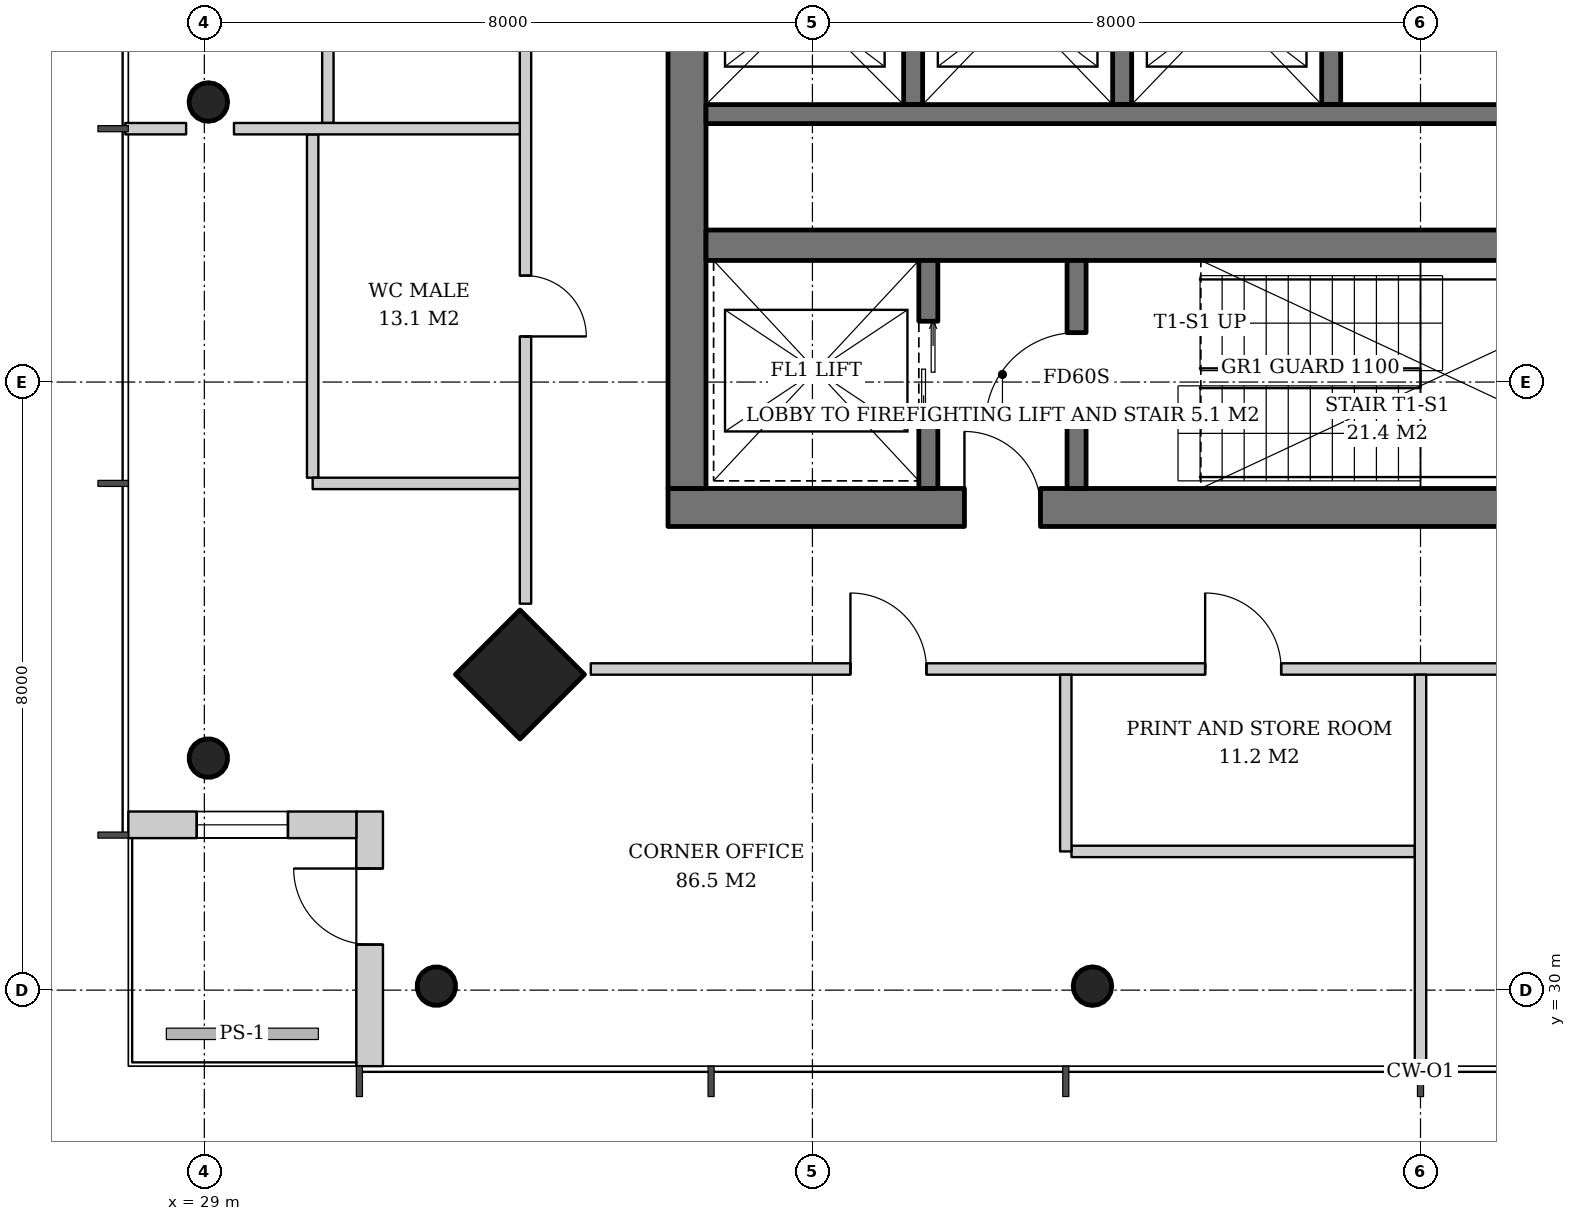
"""IFC4 building model, lengths in metres.
Left out: names, types, materials, properties, quantities, classifications, styles, units other than length and angle.
Written with IfcOpenShell. Run it as: python <this file> out.ifc"""

import sys

from ifc_helpers import new_model, si_unit, direction, frame, frame_2d, origin, origin_2d, place, context, subcontext, project, spatial, rectangle, hollow_circle, extrude, element, fill, save


model = new_model("IFC4")
c1 = context("Model", 3, precision=1e-05, world=origin(), true_north=direction((0.0, 1.0)))
c2 = subcontext(c1, "Body", "Model", "MODEL_VIEW")
j1 = project(units=[si_unit("LENGTHUNIT", "METRE"), si_unit("PLANEANGLEUNIT", "RADIAN")], contexts=[c1])
p1 = place(None, origin())
s1 = spatial("IfcSite", under=j1, at=p1, CompositionType="ELEMENT")
p2 = place(p1, origin())
s2 = spatial("IfcBuilding", under=s1, at=p2, CompositionType="ELEMENT")
p3 = place(p2, frame((0.0, 0.0, 271.8)))
s3 = spatial("IfcBuildingStorey", under=s2, at=p3, CompositionType="ELEMENT", Elevation=271.8)
p4 = place(p3, frame((33.114, 34.114, 0.0), z_axis=(0.031898107953, 0.031898107953, 0.998981992539), x_axis=(-0.707106781187, 0.707106781187, 0.0)))
e1 = element("IfcColumn", 1, at=p4, inside=s3, PredefinedType="COLUMN", context=c2, shape_type="SweptSolid", body=[
    extrude(rectangle(XDim=1.2, YDim=1.2, at=origin_2d()), origin(), (0.0, 0.0, 1.0), 3.804),
])
p5 = place(p3, frame((29.014, 33.014, 0.0), z_axis=(0.031898107953, 0.031898107953, 0.998981992539), x_axis=(-0.707106781187, 0.707106781187, 0.0)))
e2 = element("IfcColumn", 2, at=p5, inside=s3, PredefinedType="COLUMN", context=c2, shape_type="SweptSolid", body=[
    extrude(hollow_circle(Radius=0.254, WallThickness=0.02, at=origin_2d()), origin(), (0.0, 0.0, 1.0), 3.804),
])
p6 = place(p3, frame((29.014, 41.671, 0.0), z_axis=(0.031912535354, 0.010658915229, 0.999433828532), x_axis=(-0.316800238982, 0.948492281772, 0.0)))
e3 = element("IfcColumn", 3, at=p6, inside=s3, PredefinedType="COLUMN", context=c2, shape_type="SweptSolid", body=[
    extrude(hollow_circle(Radius=0.254, WallThickness=0.02, at=origin_2d()), origin(), (0.0, 0.0, 1.0), 3.802),
])
p7 = place(p3, frame((32.014, 30.014, 0.0), z_axis=(0.031898107953, 0.031898107953, 0.998981992539), x_axis=(-0.707106781187, 0.707106781187, 0.0)))
e4 = element("IfcColumn", 4, at=p7, inside=s3, PredefinedType="COLUMN", context=c2, shape_type="SweptSolid", body=[
    extrude(hollow_circle(Radius=0.254, WallThickness=0.02, at=origin_2d()), origin(), (0.0, 0.0, 1.0), 3.804),
])
p8 = place(p3, frame((40.671, 30.014, 0.0), z_axis=(0.010658915229, 0.031912535354, 0.999433828532), x_axis=(-0.948492281772, 0.316800238982, 0.0)))
e5 = element("IfcColumn", 5, at=p8, inside=s3, PredefinedType="COLUMN", context=c2, shape_type="SweptSolid", body=[
    extrude(hollow_circle(Radius=0.254, WallThickness=0.02, at=origin_2d()), origin(), (0.0, 0.0, 1.0), 3.802),
])
p9 = place(p3, frame((35.1, 36.35, 0.0), z_axis=(0.0, 0.0, 1.0), x_axis=(1.0, 0.0, 0.0)))
e6 = element("IfcWall", 6, at=p9, inside=s3, PredefinedType="SHEAR", context=c2, shape_type="SweptSolid", body=[
    extrude(rectangle(XDim=19.8, YDim=0.5, at=frame_2d((9.9, 0.0))), origin(), (0.0, 0.0, 1.0), 3.8),
])
p10 = place(p9, frame((3.9, 0.0, 0.0)))
e7 = element("IfcOpeningElement", 7, at=p10, cuts=e6, PredefinedType="OPENING", context=c2, shape_type="SweptSolid", body=[
    extrude(rectangle(XDim=1.0, YDim=2.1, at=frame_2d((0.5, 1.05))), frame((0.0, 0.26, 0.0), z_axis=(0.0, -1.0, 0.0), x_axis=(1.0, 0.0, 0.0)), (0.0, 0.0, 1.0), 0.52),
])
p11 = place(p9, frame((15.35, 0.0, 0.0)))
e8 = element("IfcOpeningElement", 8, at=p11, cuts=e6, PredefinedType="OPENING", context=c2, shape_type="SweptSolid", body=[
    extrude(rectangle(XDim=1.0, YDim=2.1, at=frame_2d((0.5, 1.05))), frame((0.0, 0.26, 0.0), z_axis=(0.0, -1.0, 0.0), x_axis=(1.0, 0.0, 0.0)), (0.0, 0.0, 1.0), 0.52),
])
p12 = place(p3, frame((35.35, 36.6, 0.0), z_axis=(0.0, 0.0, 1.0), x_axis=(0.0, 1.0, 0.0)))
e9 = element("IfcWall", 9, at=p12, inside=s3, PredefinedType="SHEAR", context=c2, shape_type="SweptSolid", body=[
    extrude(rectangle(XDim=18.8, YDim=0.5, at=frame_2d((9.4, 0.0))), origin(), (0.0, 0.0, 1.0), 3.8),
])
p13 = place(p12, frame((8.5, 0.0, 0.0)))
e10 = element("IfcOpeningElement", 10, at=p13, cuts=e9, PredefinedType="OPENING", context=c2, shape_type="SweptSolid", body=[
    extrude(rectangle(XDim=1.8, YDim=2.4, at=frame_2d((0.9, 1.2))), frame((0.0, 0.26, 0.0), z_axis=(0.0, -1.0, 0.0), x_axis=(1.0, 0.0, 0.0)), (0.0, 0.0, 1.0), 0.52),
])
p14 = place(p3, frame((35.6, 39.8, 0.0), z_axis=(0.0, 0.0, 1.0), x_axis=(1.0, 0.0, 0.0)))
e11 = element("IfcWall", 11, at=p14, inside=s3, PredefinedType="SHEAR", context=c2, shape_type="SweptSolid", body=[
    extrude(rectangle(XDim=18.8, YDim=0.4, at=frame_2d((9.4, 0.0))), origin(), (0.0, 0.0, 1.0), 3.8),
])
p15 = place(p3, frame((31.175, 29.0, 0.0), z_axis=(0.0, 0.0, 1.0), x_axis=(0.0, 1.0, 0.0)))
e12 = element("IfcWall", 12, at=p15, inside=s3, PredefinedType="SOLIDWALL", context=c2, shape_type="SweptSolid", body=[
    extrude(rectangle(XDim=3.35, YDim=0.35, at=frame_2d((1.675, 0.0))), origin(), (0.0, 0.0, 1.0), 3.62),
])
p16 = place(p15, frame((1.6, 0.0, 0.0)))
e13 = element("IfcOpeningElement", 13, at=p16, cuts=e12, PredefinedType="OPENING", context=c2, shape_type="SweptSolid", body=[
    extrude(rectangle(XDim=1.0, YDim=2.4, at=frame_2d((0.5, 1.2))), frame((0.0, 0.185, 0.0), z_axis=(0.0, -1.0, 0.0), x_axis=(1.0, 0.0, 0.0)), (0.0, 0.0, 1.0), 0.37),
])
p17 = place(p3, frame((31.0, 32.175, 0.0), z_axis=(0.0, 0.0, 1.0), x_axis=(-1.0, 0.0, 0.0)))
e14 = element("IfcWall", 14, at=p17, inside=s3, PredefinedType="SOLIDWALL", context=c2, shape_type="SweptSolid", body=[
    extrude(rectangle(XDim=3.0, YDim=0.35, at=frame_2d((1.5, 0.0))), origin(), (0.0, 0.0, 1.0), 3.62),
])
p18 = place(p17, frame((0.9, 0.0, 0.6)))
e15 = element("IfcOpeningElement", 15, at=p18, cuts=e14, PredefinedType="OPENING", context=c2, shape_type="SweptSolid", body=[
    extrude(rectangle(XDim=1.2, YDim=2.55, at=frame_2d((0.6, 1.275))), frame((0.0, 0.185, 0.0), z_axis=(0.0, -1.0, 0.0), x_axis=(1.0, 0.0, 0.0)), (0.0, 0.0, 1.0), 0.37),
])
p19 = place(p3, frame((38.525, 36.6, 0.0), z_axis=(0.0, 0.0, 1.0), x_axis=(0.0, 1.0, 0.0)))
e16 = element("IfcWall", 16, at=p19, inside=s3, PredefinedType="SHEAR", context=c2, shape_type="SweptSolid", body=[
    extrude(rectangle(XDim=3.0, YDim=0.25, at=frame_2d((1.5, 0.0))), origin(), (0.0, 0.0, 1.0), 3.8),
])
p20 = place(p19, frame((0.9, 0.0, 0.0)))
e17 = element("IfcOpeningElement", 17, at=p20, cuts=e16, PredefinedType="OPENING", context=c2, shape_type="SweptSolid", body=[
    extrude(rectangle(XDim=1.3, YDim=2.2, at=frame_2d((0.65, 1.1))), frame((0.0, 0.135, 0.0), z_axis=(0.0, -1.0, 0.0), x_axis=(1.0, 0.0, 0.0)), (0.0, 0.0, 1.0), 0.27),
])
p21 = place(p3, frame((40.475, 36.6, 0.0), z_axis=(0.0, 0.0, 1.0), x_axis=(0.0, 1.0, 0.0)))
e18 = element("IfcWall", 18, at=p21, inside=s3, PredefinedType="SHEAR", context=c2, shape_type="SweptSolid", body=[
    extrude(rectangle(XDim=3.0, YDim=0.25, at=frame_2d((1.5, 0.0))), origin(), (0.0, 0.0, 1.0), 3.8),
])
p22 = place(p21, frame((0.85, 0.0, 0.0)))
e19 = element("IfcOpeningElement", 19, at=p22, cuts=e18, PredefinedType="OPENING", context=c2, shape_type="SweptSolid", body=[
    extrude(rectangle(XDim=1.2, YDim=2.1, at=frame_2d((0.6, 1.05))), frame((0.0, 0.135, 0.0), z_axis=(0.0, -1.0, 0.0), x_axis=(1.0, 0.0, 0.0)), (0.0, 0.0, 1.0), 0.27),
])
for number, where, z_axis, x_axis in (
    (20, (38.325, 44.25, 0.0), (0.0, 0.0, 1.0), (0.0, -1.0, 0.0)),
    (21, (41.075, 44.25, 0.0), (0.0, 0.0, 1.0), (0.0, -1.0, 0.0)),
    (22, (43.825, 44.25, 0.0), (0.0, 0.0, 1.0), (0.0, -1.0, 0.0)),
):
    element("IfcWall", number, at=place(p3, frame(where, z_axis=z_axis, x_axis=x_axis)), inside=s3, PredefinedType="SHEAR", context=c2, shape_type="SweptSolid", body=[
        extrude(rectangle(XDim=2.6, YDim=0.25, at=frame_2d((1.3, 0.0))), origin(), (0.0, 0.0, 1.0), 3.8),
    ])
p23 = place(p3, frame((35.6, 41.525, 0.0), z_axis=(0.0, 0.0, 1.0), x_axis=(1.0, 0.0, 0.0)))
e23 = element("IfcWall", 23, at=p23, inside=s3, PredefinedType="SHEAR", context=c2, shape_type="SweptSolid", body=[
    extrude(rectangle(XDim=11.1, YDim=0.25, at=frame_2d((5.55, 0.0))), origin(), (0.0, 0.0, 1.0), 3.8),
])
for number, where, z_axis, x_axis in (
    (24, (30.625, 45.925, 0.0), (0.0, 0.0, 1.0), (0.0, -1.0, 0.0)),
    (25, (30.425, 41.258, 0.0), (0.0, 0.0, 1.0), (0.0, -1.0, 0.0)),
):
    element("IfcWall", number, at=place(p3, frame(where, z_axis=z_axis, x_axis=x_axis)), inside=s3, PredefinedType="PARTITIONING", context=c2, shape_type="SweptSolid", body=[
        extrude(rectangle(XDim=4.517, YDim=0.15, at=frame_2d((2.258, 0.0))), origin(), (0.0, 0.0, 1.0), 3.12),
    ])
p24 = place(p3, frame((33.225, 56.916, 0.0), z_axis=(0.0, 0.0, 1.0), x_axis=(0.0, -1.0, 0.0)))
e26 = element("IfcWall", 26, at=p24, inside=s3, PredefinedType="PARTITIONING", context=c2, shape_type="SweptSolid", body=[
    extrude(rectangle(XDim=21.832, YDim=0.15, at=frame_2d((10.916, 0.0))), origin(), (0.0, 0.0, 1.0), 3.02),
])
p25 = place(p24, frame((3.416, 0.0, 0.0)))
e27 = element("IfcOpeningElement", 27, at=p25, cuts=e26, PredefinedType="OPENING", context=c2, shape_type="SweptSolid", body=[
    extrude(rectangle(XDim=1.0, YDim=2.1, at=frame_2d((0.5, 1.05))), frame((0.0, 0.085, 0.0), z_axis=(0.0, -1.0, 0.0), x_axis=(1.0, 0.0, 0.0)), (0.0, 0.0, 1.0), 0.17),
])
p26 = place(p24, frame((8.182, 0.0, 0.0)))
e28 = element("IfcOpeningElement", 28, at=p26, cuts=e26, PredefinedType="OPENING", context=c2, shape_type="SweptSolid", body=[
    extrude(rectangle(XDim=0.8, YDim=2.1, at=frame_2d((0.4, 1.05))), frame((0.0, 0.085, 0.0), z_axis=(0.0, -1.0, 0.0), x_axis=(1.0, 0.0, 0.0)), (0.0, 0.0, 1.0), 0.17),
])
p27 = place(p24, frame((12.749, 0.0, 0.0)))
e29 = element("IfcOpeningElement", 29, at=p27, cuts=e26, PredefinedType="OPENING", context=c2, shape_type="SweptSolid", body=[
    extrude(rectangle(XDim=1.0, YDim=2.1, at=frame_2d((0.5, 1.05))), frame((0.0, 0.085, 0.0), z_axis=(0.0, -1.0, 0.0), x_axis=(1.0, 0.0, 0.0)), (0.0, 0.0, 1.0), 0.17),
])
p28 = place(p24, frame((17.516, 0.0, 0.0)))
e30 = element("IfcOpeningElement", 30, at=p28, cuts=e26, PredefinedType="OPENING", context=c2, shape_type="SweptSolid", body=[
    extrude(rectangle(XDim=0.8, YDim=2.1, at=frame_2d((0.4, 1.05))), frame((0.0, 0.085, 0.0), z_axis=(0.0, -1.0, 0.0), x_axis=(1.0, 0.0, 0.0)), (0.0, 0.0, 1.0), 0.17),
])
p29 = place(p3, frame((33.15, 41.333, 0.0), z_axis=(0.0, 0.0, 1.0), x_axis=(-1.0, 0.0, 0.0)))
e31 = element("IfcWall", 31, at=p29, inside=s3, PredefinedType="PARTITIONING", context=c2, shape_type="SweptSolid", body=[
    extrude(rectangle(XDim=3.76, YDim=0.15, at=frame_2d((1.88, 0.0))), origin(), (0.0, 0.0, 1.0), 3.62),
])
p30 = place(p3, frame((28.76, 41.333, 0.0), z_axis=(0.0, 0.0, 1.0), x_axis=(-1.0, 0.0, 0.0)))
e32 = element("IfcWall", 32, at=p30, inside=s3, PredefinedType="PARTITIONING", context=c2, shape_type="SweptSolid", body=[
    extrude(rectangle(XDim=0.8, YDim=0.15, at=frame_2d((0.4, 0.0))), origin(), (0.0, 0.0, 1.0), 3.62),
])
p31 = place(p3, frame((33.15, 36.667, 0.0), z_axis=(0.0, 0.0, 1.0), x_axis=(-1.0, 0.0, 0.0)))
e33 = element("IfcWall", 33, at=p31, inside=s3, PredefinedType="PARTITIONING", context=c2, shape_type="SweptSolid", body=[
    extrude(rectangle(XDim=2.725, YDim=0.15, at=frame_2d((1.362, 0.0))), origin(), (0.0, 0.0, 1.0), 3.62),
])
p32 = place(p3, frame((40.408, 31.825, 0.0), z_axis=(0.0, 0.0, 1.0), x_axis=(1.0, 0.0, 0.0)))
e34 = element("IfcWall", 34, at=p32, inside=s3, PredefinedType="PARTITIONING", context=c2, shape_type="SweptSolid", body=[
    extrude(rectangle(XDim=4.517, YDim=0.15, at=frame_2d((2.258, 0.0))), origin(), (0.0, 0.0, 1.0), 3.12),
])
p33 = place(p3, frame((34.084, 34.225, 0.0), z_axis=(0.0, 0.0, 1.0), x_axis=(1.0, 0.0, 0.0)))
e35 = element("IfcWall", 35, at=p33, inside=s3, PredefinedType="PARTITIONING", context=c2, shape_type="SweptSolid", body=[
    extrude(rectangle(XDim=21.832, YDim=0.15, at=frame_2d((10.916, 0.0))), origin(), (0.0, 0.0, 1.0), 3.02),
])
p34 = place(p33, frame((3.416, 0.0, 0.0)))
e36 = element("IfcOpeningElement", 36, at=p34, cuts=e35, PredefinedType="OPENING", context=c2, shape_type="SweptSolid", body=[
    extrude(rectangle(XDim=1.0, YDim=2.1, at=frame_2d((0.5, 1.05))), frame((0.0, 0.085, 0.0), z_axis=(0.0, -1.0, 0.0), x_axis=(1.0, 0.0, 0.0)), (0.0, 0.0, 1.0), 0.17),
])
p35 = place(p33, frame((8.083, 0.0, 0.0)))
e37 = element("IfcOpeningElement", 37, at=p35, cuts=e35, PredefinedType="OPENING", context=c2, shape_type="SweptSolid", body=[
    extrude(rectangle(XDim=1.0, YDim=2.1, at=frame_2d((0.5, 1.05))), frame((0.0, 0.085, 0.0), z_axis=(0.0, -1.0, 0.0), x_axis=(1.0, 0.0, 0.0)), (0.0, 0.0, 1.0), 0.17),
])
p36 = place(p33, frame((12.749, 0.0, 0.0)))
e38 = element("IfcOpeningElement", 38, at=p36, cuts=e35, PredefinedType="OPENING", context=c2, shape_type="SweptSolid", body=[
    extrude(rectangle(XDim=1.0, YDim=2.1, at=frame_2d((0.5, 1.05))), frame((0.0, 0.085, 0.0), z_axis=(0.0, -1.0, 0.0), x_axis=(1.0, 0.0, 0.0)), (0.0, 0.0, 1.0), 0.17),
])
p37 = place(p33, frame((17.416, 0.0, 0.0)))
e39 = element("IfcOpeningElement", 39, at=p37, cuts=e35, PredefinedType="OPENING", context=c2, shape_type="SweptSolid", body=[
    extrude(rectangle(XDim=1.0, YDim=2.1, at=frame_2d((0.5, 1.05))), frame((0.0, 0.085, 0.0), z_axis=(0.0, -1.0, 0.0), x_axis=(1.0, 0.0, 0.0)), (0.0, 0.0, 1.0), 0.17),
])
p38 = place(p3, frame((40.333, 34.15, 0.0), z_axis=(0.0, 0.0, 1.0), x_axis=(0.0, -1.0, 0.0)))
e40 = element("IfcWall", 40, at=p38, inside=s3, PredefinedType="PARTITIONING", context=c2, shape_type="SweptSolid", body=[
    extrude(rectangle(XDim=2.325, YDim=0.15, at=frame_2d((1.163, 0.0))), origin(), (0.0, 0.0, 1.0), 3.62),
])
p39 = place(p3, frame((45.0, 34.15, 0.0), z_axis=(0.0, 0.0, 1.0), x_axis=(0.0, -1.0, 0.0)))
e41 = element("IfcWall", 41, at=p39, inside=s3, PredefinedType="PARTITIONING", context=c2, shape_type="SweptSolid", body=[
    extrude(rectangle(XDim=5.19, YDim=0.15, at=frame_2d((2.595, 0.0))), origin(), (0.0, 0.0, 1.0), 3.12),
])
p40 = place(p16, origin())
e42 = element("IfcDoor", 42, at=p40, inside=s3, OperationType="SINGLE_SWING_RIGHT", PredefinedType="DOOR", context=c2, shape_type="SweptSolid", body=[
    extrude(rectangle(XDim=1.0, YDim=2.4, at=frame_2d((0.5, 1.2))), frame((0.0, 0.025, 0.0), z_axis=(0.0, -1.0, 0.0), x_axis=(1.0, 0.0, 0.0)), (0.0, 0.0, 1.0), 0.05),
])
fill(e13, e42)
p41 = place(p18, origin())
e43 = element("IfcWindow", 43, at=p41, inside=s3, PartitioningType="SINGLE_PANEL", PredefinedType="WINDOW", context=c2, shape_type="SweptSolid", body=[
    extrude(rectangle(XDim=1.2, YDim=2.55, at=frame_2d((0.6, 1.275))), frame((0.0, 0.03, 0.0), z_axis=(0.0, -1.0, 0.0), x_axis=(1.0, 0.0, 0.0)), (0.0, 0.0, 1.0), 0.06),
])
fill(e15, e43)
p42 = place(p20, origin())
e44 = element("IfcDoor", 44, at=p42, inside=s3, OperationType="DOUBLE_DOOR_SLIDING", PredefinedType="DOOR", context=c2, shape_type="SweptSolid", body=[
    extrude(rectangle(XDim=1.3, YDim=2.2, at=frame_2d((0.65, 1.1))), frame((0.0, 0.025, 0.0), z_axis=(0.0, -1.0, 0.0), x_axis=(1.0, 0.0, 0.0)), (0.0, 0.0, 1.0), 0.05),
])
fill(e17, e44)
p43 = place(p22, origin())
e45 = element("IfcDoor", 45, at=p43, inside=s3, OperationType="SINGLE_SWING_LEFT", PredefinedType="DOOR", context=c2, shape_type="SweptSolid", body=[
    extrude(rectangle(XDim=1.2, YDim=2.1, at=frame_2d((0.6, 1.05))), frame((0.0, 0.025, 0.0), z_axis=(0.0, -1.0, 0.0), x_axis=(1.0, 0.0, 0.0)), (0.0, 0.0, 1.0), 0.05),
])
fill(e19, e45)
p44 = place(p10, origin())
e46 = element("IfcDoor", 46, at=p44, inside=s3, OperationType="SINGLE_SWING_LEFT", PredefinedType="DOOR", context=c2, shape_type="SweptSolid", body=[
    extrude(rectangle(XDim=1.0, YDim=2.1, at=frame_2d((0.5, 1.05))), frame((0.0, 0.025, 0.0), z_axis=(0.0, -1.0, 0.0), x_axis=(1.0, 0.0, 0.0)), (0.0, 0.0, 1.0), 0.05),
])
fill(e7, e46)
p45 = place(p28, origin())
e47 = element("IfcDoor", 47, at=p45, inside=s3, OperationType="SINGLE_SWING_RIGHT", PredefinedType="DOOR", context=c2, shape_type="SweptSolid", body=[
    extrude(rectangle(XDim=0.8, YDim=2.1, at=frame_2d((0.4, 1.05))), frame((0.0, 0.025, 0.0), z_axis=(0.0, -1.0, 0.0), x_axis=(1.0, 0.0, 0.0)), (0.0, 0.0, 1.0), 0.05),
])
fill(e30, e47)
p46 = place(p34, origin())
e48 = element("IfcDoor", 48, at=p46, inside=s3, OperationType="SINGLE_SWING_LEFT", PredefinedType="DOOR", context=c2, shape_type="SweptSolid", body=[
    extrude(rectangle(XDim=1.0, YDim=2.1, at=frame_2d((0.5, 1.05))), frame((0.0, 0.025, 0.0), z_axis=(0.0, -1.0, 0.0), x_axis=(1.0, 0.0, 0.0)), (0.0, 0.0, 1.0), 0.05),
])
fill(e36, e48)
p47 = place(p35, origin())
e49 = element("IfcDoor", 49, at=p47, inside=s3, OperationType="SINGLE_SWING_LEFT", PredefinedType="DOOR", context=c2, shape_type="SweptSolid", body=[
    extrude(rectangle(XDim=1.0, YDim=2.1, at=frame_2d((0.5, 1.05))), frame((0.0, 0.025, 0.0), z_axis=(0.0, -1.0, 0.0), x_axis=(1.0, 0.0, 0.0)), (0.0, 0.0, 1.0), 0.05),
])
fill(e37, e49)
save(model, sys.argv[1])
